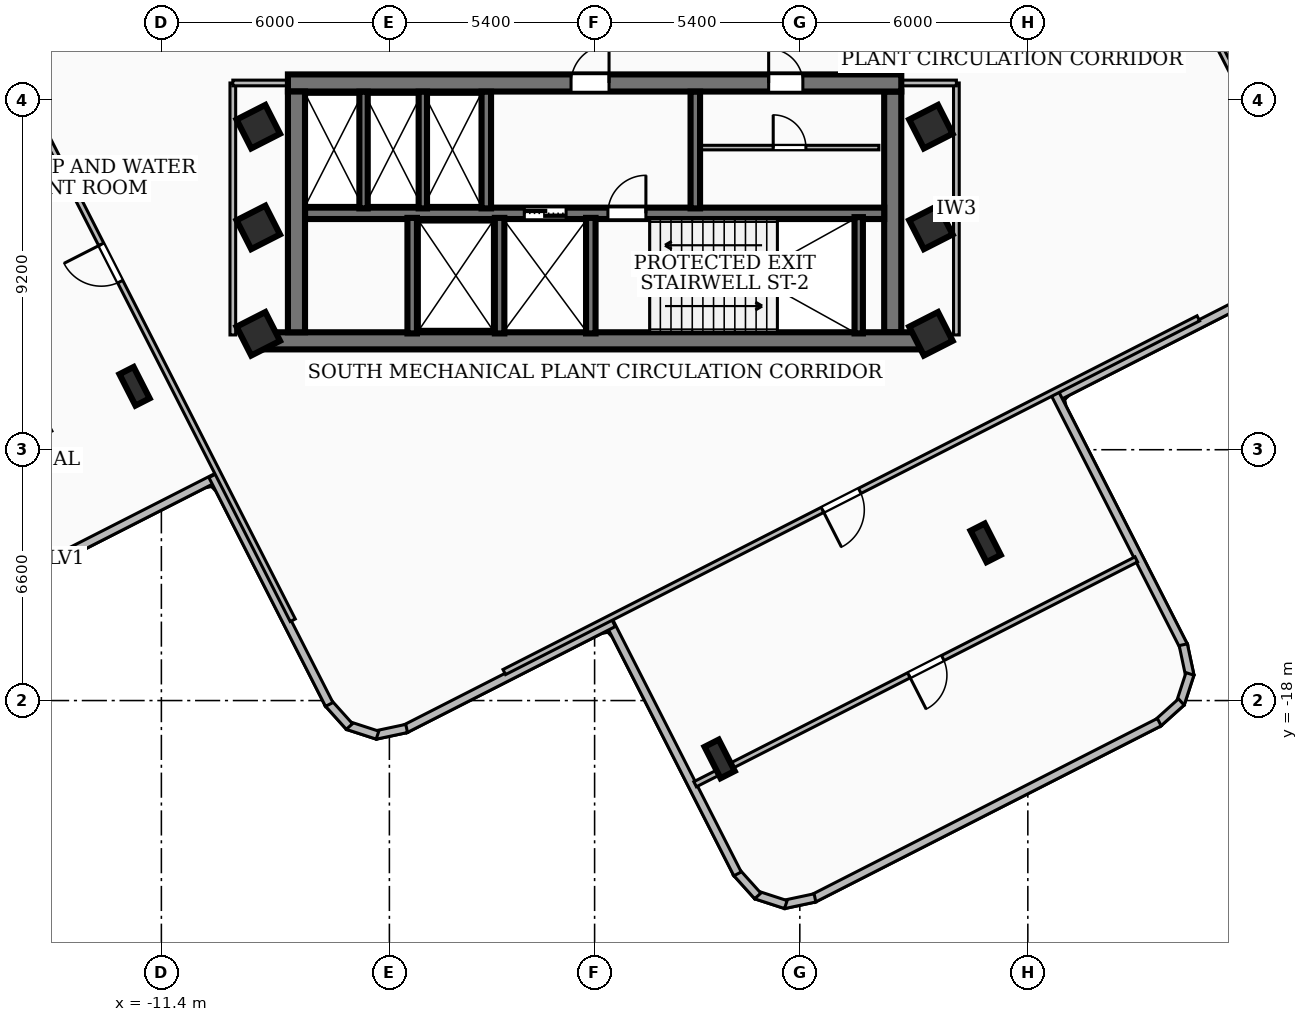
"""IFC4 building model, lengths in metres.
Left out: names, types, materials, properties, quantities, classifications, styles, units other than length and angle.
Written with IfcOpenShell. Run it as: python <this file> out.ifc"""

import sys

from ifc_helpers import new_model, si_unit, direction, frame, frame_2d, origin, origin_2d, place, context, subcontext, project, spatial, rectangle, i_section, extrude, element, fill, save


model = new_model("IFC4")
c1 = context("Model", 3, precision=1e-05, world=origin(), true_north=direction((0.0, 1.0)))
c2 = subcontext(c1, "Body", "Model", "MODEL_VIEW")
j1 = project(units=[si_unit("LENGTHUNIT", "METRE"), si_unit("PLANEANGLEUNIT", "RADIAN")], contexts=[c1])
p1 = place(None, origin())
s1 = spatial("IfcSite", under=j1, at=p1, CompositionType="ELEMENT")
p2 = place(p1, origin())
s2 = spatial("IfcBuilding", under=s1, at=p2, CompositionType="ELEMENT")
p3 = place(p2, frame((0.0, 0.0, 196.2)))
s3 = spatial("IfcBuildingStorey", under=s2, at=p3, CompositionType="ELEMENT", Elevation=196.2)
p4 = place(p3, frame((8.78, -8.535, 0.0), z_axis=(0.0, 0.0, 1.0), x_axis=(-1.0, 0.0, 0.0)))
e1 = element("IfcWall", 1, at=p4, inside=s3, PredefinedType="SHEAR", context=c2, shape_type="SweptSolid", body=[
    extrude(rectangle(XDim=17.56, YDim=0.45, at=frame_2d((8.78, 0.0))), origin(), (0.0, 0.0, 1.0), 4.42),
])
p5 = place(p3, frame((-8.07, -1.75, 0.0), z_axis=(0.0, 0.0, 1.0), x_axis=(1.0, 0.0, 0.0)))
e2 = element("IfcWall", 2, at=p5, inside=s3, PredefinedType="SHEAR", context=c2, shape_type="SweptSolid", body=[
    extrude(rectangle(XDim=16.14, YDim=0.45, at=frame_2d((8.07, 0.0))), origin(), (0.0, 0.0, 1.0), 4.42),
])
p6 = place(p5, frame((7.45, 0.0, 0.0)))
e3 = element("IfcOpeningElement", 3, at=p6, cuts=e2, PredefinedType="OPENING", context=c2, shape_type="SweptSolid", body=[
    extrude(rectangle(XDim=1.0, YDim=2.1, at=frame_2d((0.5, 1.05))), frame((0.0, 0.235, 0.0), z_axis=(0.0, -1.0, 0.0), x_axis=(1.0, 0.0, 0.0)), (0.0, 0.0, 1.0), 0.47),
])
p7 = place(p5, frame((12.65, 0.0, 0.0)))
e4 = element("IfcOpeningElement", 4, at=p7, cuts=e2, PredefinedType="OPENING", context=c2, shape_type="SweptSolid", body=[
    extrude(rectangle(XDim=0.9, YDim=2.06, at=frame_2d((0.45, 1.03))), frame((0.0, 0.235, 0.0), z_axis=(0.0, -1.0, 0.0), x_axis=(1.0, 0.0, 0.0)), (0.0, 0.0, 1.0), 0.47),
])
for number, where, z_axis, x_axis in (
    (5, (-7.845, -8.31, 0.0), (0.0, 0.0, 1.0), (0.0, 1.0, 0.0)),
    (6, (7.845, -1.975, 0.0), (0.0, 0.0, 1.0), (0.0, -1.0, 0.0)),
):
    element("IfcWall", number, at=place(p3, frame(where, z_axis=z_axis, x_axis=x_axis)), inside=s3, PredefinedType="SHEAR", context=c2, shape_type="SweptSolid", body=[
        extrude(rectangle(XDim=6.335, YDim=0.45, at=frame_2d((3.167, 0.0))), origin(), (0.0, 0.0, 1.0), 4.42),
    ])
p8 = place(p3, frame((-7.62, -5.18, 0.0), z_axis=(0.0, 0.0, 1.0), x_axis=(1.0, 0.0, 0.0)))
e7 = element("IfcWall", 7, at=p8, inside=s3, PredefinedType="SOLIDWALL", context=c2, shape_type="SweptSolid", body=[
    extrude(rectangle(XDim=15.24, YDim=0.3, at=frame_2d((7.62, 0.0))), origin(), (0.0, 0.0, 1.0), 4.42),
])
p9 = place(p8, frame((5.77, 0.0, 0.0)))
e8 = element("IfcOpeningElement", 8, at=p9, cuts=e7, PredefinedType="OPENING", context=c2, shape_type="SweptSolid", body=[
    extrude(rectangle(XDim=1.1, YDim=2.15, at=frame_2d((0.55, 1.075))), frame((0.0, 0.16, 0.0), z_axis=(0.0, -1.0, 0.0), x_axis=(1.0, 0.0, 0.0)), (0.0, 0.0, 1.0), 0.32),
])
p10 = place(p8, frame((7.97, 0.0, 0.0)))
e9 = element("IfcOpeningElement", 9, at=p10, cuts=e7, PredefinedType="OPENING", context=c2, shape_type="SweptSolid", body=[
    extrude(rectangle(XDim=1.0, YDim=2.1, at=frame_2d((0.5, 1.05))), frame((0.0, 0.16, 0.0), z_axis=(0.0, -1.0, 0.0), x_axis=(1.0, 0.0, 0.0)), (0.0, 0.0, 1.0), 0.32),
])
p11 = place(p3, frame((6.95, -8.34, 0.0), z_axis=(0.0, 0.0, 1.0), x_axis=(0.0, 1.0, 0.0)))
e10 = element("IfcWall", 10, at=p11, inside=s3, PredefinedType="SOLIDWALL", context=c2, shape_type="SweptSolid", body=[
    extrude(rectangle(XDim=3.06, YDim=0.22, at=frame_2d((1.53, 0.0))), origin(), (0.0, 0.0, 1.0), 4.42),
])
for number, where, z_axis, x_axis in (
    (11, (-0.1, -8.34, 0.0), (0.0, 0.0, 1.0), (0.0, 1.0, 0.0)),
    (12, (-2.5, -8.34, 0.0), (0.0, 0.0, 1.0), (0.0, 1.0, 0.0)),
    (13, (-4.8, -8.34, 0.0), (0.0, 0.0, 1.0), (0.0, 1.0, 0.0)),
):
    element("IfcWall", number, at=place(p3, frame(where, z_axis=z_axis, x_axis=x_axis)), inside=s3, PredefinedType="SOLIDWALL", context=c2, shape_type="SweptSolid", body=[
        extrude(rectangle(XDim=3.04, YDim=0.25, at=frame_2d((1.52, 0.0))), origin(), (0.0, 0.0, 1.0), 4.42),
    ])
for number, where, z_axis, x_axis in (
    (14, (-2.85, -5.05, 0.0), (0.0, 0.0, 1.0), (0.0, 1.0, 0.0)),
    (15, (2.65, -5.05, 0.0), (0.0, 0.0, 1.0), (0.0, 1.0, 0.0)),
):
    element("IfcWall", number, at=place(p3, frame(where, z_axis=z_axis, x_axis=x_axis)), inside=s3, PredefinedType="SOLIDWALL", context=c2, shape_type="SweptSolid", body=[
        extrude(rectangle(XDim=3.07, YDim=0.25, at=frame_2d((1.535, 0.0))), origin(), (0.0, 0.0, 1.0), 4.42),
    ])
for number, where, z_axis, x_axis in (
    (16, (-6.08, -5.05, 0.0), (0.0, 0.0, 1.0), (0.0, 1.0, 0.0)),
    (17, (-4.52, -5.05, 0.0), (0.0, 0.0, 1.0), (0.0, 1.0, 0.0)),
):
    element("IfcWall", number, at=place(p3, frame(where, z_axis=z_axis, x_axis=x_axis)), inside=s3, PredefinedType="SOLIDWALL", context=c2, shape_type="SweptSolid", body=[
        extrude(rectangle(XDim=3.07, YDim=0.22, at=frame_2d((1.535, 0.0))), origin(), (0.0, 0.0, 1.0), 4.42),
    ])
for number, where, z_axis, x_axis in (
    (18, (-8.85, -5.55, 0.0), (0.0, 0.0, 1.0), (0.891, 0.454, 0.0)),
    (19, (-8.85, -2.9, 0.0), (0.0, 0.0, 1.0), (0.891, 0.454, 0.0)),
    (20, (8.85, -5.55, 0.0), (0.0, 0.0, 1.0), (0.891, 0.454, 0.0)),
    (21, (8.85, -2.9, 0.0), (0.0, 0.0, 1.0), (0.891, 0.454, 0.0)),
    (22, (8.85, -8.35, 0.0), (0.0, 0.0, 1.0), (0.891, 0.454, 0.0)),
    (23, (-8.85, -8.35, 0.0), (0.0, 0.0, 1.0), (0.891, 0.454, 0.0)),
):
    element("IfcColumn", number, at=place(p3, frame(where, z_axis=z_axis, x_axis=x_axis)), inside=s3, PredefinedType="COLUMN", context=c2, shape_type="SweptSolid", body=[
        extrude(rectangle(XDim=0.85, YDim=0.85, at=origin_2d()), origin(), (0.0, 0.0, 1.0), 4.68),
    ])
for number, where, z_axis, x_axis in (
    (24, (-12.106, -9.731, 0.0), (0.0, 0.0, 1.0), (0.891, 0.454, 0.0)),
    (25, (3.29, -19.536, 0.0), (0.0, 0.0, 1.0), (0.891, 0.454, 0.0)),
    (26, (10.29, -13.85, 0.0), (0.0, 0.0, 1.0), (0.891, 0.454, 0.0)),
):
    element("IfcColumn", number, at=place(p3, frame(where, z_axis=z_axis, x_axis=x_axis)), inside=s3, PredefinedType="COLUMN", context=c2, shape_type="SweptSolid", body=[
        extrude(i_section(OverallWidth=0.418, OverallDepth=0.927, WebThickness=0.019, FlangeThickness=0.032, at=origin_2d()), origin(), (0.0, 0.0, 1.0), 4.68),
    ])
p12 = place(p3, frame((-9.933, -12.12, 0.0), z_axis=(0.0, 0.0, 1.0), x_axis=(-0.89100493447, -0.453993619724, 0.0)))
e27 = element("IfcWall", 27, at=p12, inside=s3, PredefinedType="SOLIDWALL", context=c2, shape_type="SweptSolid", body=[
    extrude(rectangle(XDim=9.057, YDim=0.22, at=frame_2d((4.528, 0.0))), origin(), (0.0, 0.0, 1.0), 4.42),
])
p13 = place(p3, frame((15.954, 0.495, 0.0), z_axis=(0.0, 0.0, 1.0), x_axis=(0.454003577481, -0.890999860625, 0.0)))
e28 = element("IfcWall", 28, at=p13, inside=s3, PredefinedType="SOLIDWALL", context=c2, shape_type="SweptSolid", body=[
    extrude(rectangle(XDim=6.158, YDim=0.22, at=frame_2d((3.079, 0.0))), origin(), (0.0, 0.0, 1.0), 2.212),
])
p14 = place(p3, frame((18.103, -6.983, 0.0), z_axis=(0.0, 0.0, 1.0), x_axis=(-0.890990691232, -0.454021572326, 0.0)))
e29 = element("IfcWall", 29, at=p14, inside=s3, PredefinedType="SOLIDWALL", context=c2, shape_type="SweptSolid", body=[
    extrude(rectangle(XDim=6.758, YDim=0.22, at=frame_2d((3.379, 0.0))), origin(), (0.0, 0.0, 1.0), 2.212),
])
p15 = place(p3, frame((12.12, -9.933, 0.0), z_axis=(0.0, 0.0, 1.0), x_axis=(0.454075854948, -0.890963028387, 0.0)))
e30 = element("IfcWall", 30, at=p15, inside=s3, PredefinedType="SOLIDWALL", context=c2, shape_type="SweptSolid", body=[
    extrude(rectangle(XDim=7.457, YDim=0.22, at=frame_2d((3.729, 0.0))), origin(), (0.0, 0.0, 1.0), 2.212),
])
p16 = place(p3, frame((15.49, -16.531, 0.0), z_axis=(0.0, 0.0, 1.0), x_axis=(0.207529672301, -0.978228723313, 0.0)))
e31 = element("IfcWall", 31, at=p16, inside=s3, PredefinedType="SOLIDWALL", context=c2, shape_type="SweptSolid", body=[
    extrude(rectangle(XDim=0.834, YDim=0.22, at=frame_2d((0.417, 0.0))), origin(), (0.0, 0.0, 1.0), 4.42),
])
p17 = place(p3, frame((15.666, -17.299, 0.0), z_axis=(0.0, 0.0, 1.0), x_axis=(-0.309962035128, -0.950748934672, 0.0)))
e32 = element("IfcWall", 32, at=p17, inside=s3, PredefinedType="SOLIDWALL", context=c2, shape_type="SweptSolid", body=[
    extrude(rectangle(XDim=0.819, YDim=0.22, at=frame_2d((0.41, 0.0))), origin(), (0.0, 0.0, 1.0), 4.42),
])
p18 = place(p3, frame((15.439, -18.037, 0.0), z_axis=(0.0, 0.0, 1.0), x_axis=(-0.743250545916, -0.66901317326, 0.0)))
e33 = element("IfcWall", 33, at=p18, inside=s3, PredefinedType="SOLIDWALL", context=c2, shape_type="SweptSolid", body=[
    extrude(rectangle(XDim=0.835, YDim=0.22, at=frame_2d((0.417, 0.0))), origin(), (0.0, 0.0, 1.0), 4.42),
])
p19 = place(p3, frame((14.859, -18.568, 0.0), z_axis=(0.0, 0.0, 1.0), x_axis=(-0.890999568682, -0.454004150432, 0.0)))
e34 = element("IfcWall", 34, at=p19, inside=s3, PredefinedType="SOLIDWALL", context=c2, shape_type="SweptSolid", body=[
    extrude(rectangle(XDim=10.22, YDim=0.22, at=frame_2d((5.11, 0.0))), origin(), (0.0, 0.0, 1.0), 4.42),
])
p20 = place(p3, frame((5.799, -23.192, 0.0), z_axis=(0.0, 0.0, 1.0), x_axis=(-0.978190855041, -0.207708091112, 0.0)))
e35 = element("IfcWall", 35, at=p20, inside=s3, PredefinedType="SOLIDWALL", context=c2, shape_type="SweptSolid", body=[
    extrude(rectangle(XDim=0.833, YDim=0.22, at=frame_2d((0.417, 0.0))), origin(), (0.0, 0.0, 1.0), 4.42),
])
p21 = place(p3, frame((5.032, -23.368, 0.0), z_axis=(0.0, 0.0, 1.0), x_axis=(-0.950891804303, 0.309523466815, 0.0)))
e36 = element("IfcWall", 36, at=p21, inside=s3, PredefinedType="SOLIDWALL", context=c2, shape_type="SweptSolid", body=[
    extrude(rectangle(XDim=0.82, YDim=0.22, at=frame_2d((0.41, 0.0))), origin(), (0.0, 0.0, 1.0), 4.42),
])
p22 = place(p3, frame((4.293, -23.141, 0.0), z_axis=(0.0, 0.0, 1.0), x_axis=(-0.669029293194, 0.743236035758, 0.0)))
e37 = element("IfcWall", 37, at=p22, inside=s3, PredefinedType="SOLIDWALL", context=c2, shape_type="SweptSolid", body=[
    extrude(rectangle(XDim=0.836, YDim=0.22, at=frame_2d((0.418, 0.0))), origin(), (0.0, 0.0, 1.0), 4.42),
])
p23 = place(p3, frame((3.762, -22.561, 0.0), z_axis=(0.0, 0.0, 1.0), x_axis=(-0.453905674287, 0.89104973983, 0.0)))
e38 = element("IfcWall", 38, at=p23, inside=s3, PredefinedType="SOLIDWALL", context=c2, shape_type="SweptSolid", body=[
    extrude(rectangle(XDim=7.458, YDim=0.22, at=frame_2d((3.729, 0.0))), origin(), (0.0, 0.0, 1.0), 2.212),
])
p24 = place(p3, frame((0.495, -15.954, 0.0), z_axis=(0.0, 0.0, 1.0), x_axis=(-0.890999860625, -0.454003577481, 0.0)))
e39 = element("IfcWall", 39, at=p24, inside=s3, PredefinedType="SOLIDWALL", context=c2, shape_type="SweptSolid", body=[
    extrude(rectangle(XDim=6.158, YDim=0.22, at=frame_2d((3.079, 0.0))), origin(), (0.0, 0.0, 1.0), 2.212),
])
p25 = place(p3, frame((-4.946, -18.734, 0.0), z_axis=(0.0, 0.0, 1.0), x_axis=(-0.978178210569, -0.207767630705, 0.0)))
e40 = element("IfcWall", 40, at=p25, inside=s3, PredefinedType="SOLIDWALL", context=c2, shape_type="SweptSolid", body=[
    extrude(rectangle(XDim=0.833, YDim=0.22, at=frame_2d((0.417, 0.0))), origin(), (0.0, 0.0, 1.0), 4.42),
])
p26 = place(p3, frame((-5.713, -18.91, 0.0), z_axis=(0.0, 0.0, 1.0), x_axis=(-0.950891804303, 0.309523466815, 0.0)))
e41 = element("IfcWall", 41, at=p26, inside=s3, PredefinedType="SOLIDWALL", context=c2, shape_type="SweptSolid", body=[
    extrude(rectangle(XDim=0.82, YDim=0.22, at=frame_2d((0.41, 0.0))), origin(), (0.0, 0.0, 1.0), 4.42),
])
p27 = place(p3, frame((-6.452, -18.683, 0.0), z_axis=(0.0, 0.0, 1.0), x_axis=(-0.669029293194, 0.743236035758, 0.0)))
e42 = element("IfcWall", 42, at=p27, inside=s3, PredefinedType="SOLIDWALL", context=c2, shape_type="SweptSolid", body=[
    extrude(rectangle(XDim=0.836, YDim=0.22, at=frame_2d((0.418, 0.0))), origin(), (0.0, 0.0, 1.0), 4.42),
])
p28 = place(p3, frame((-6.983, -18.103, 0.0), z_axis=(0.0, 0.0, 1.0), x_axis=(-0.454021572326, 0.890990691232, 0.0)))
e43 = element("IfcWall", 43, at=p28, inside=s3, PredefinedType="SOLIDWALL", context=c2, shape_type="SweptSolid", body=[
    extrude(rectangle(XDim=6.758, YDim=0.22, at=frame_2d((3.379, 0.0))), origin(), (0.0, 0.0, 1.0), 4.42),
])
p29 = place(p3, frame((2.8, -3.45, 0.0), z_axis=(0.0, 0.0, 1.0), x_axis=(1.0, 0.0, 0.0)))
e44 = element("IfcWall", 44, at=p29, inside=s3, PredefinedType="PARTITIONING", context=c2, shape_type="SweptSolid", body=[
    extrude(rectangle(XDim=4.68, YDim=0.12, at=frame_2d((2.34, 0.0))), origin(), (0.0, 0.0, 1.0), 4.42),
])
p30 = place(p29, frame((1.9, 0.0, 0.0)))
e45 = element("IfcOpeningElement", 45, at=p30, cuts=e44, PredefinedType="OPENING", context=c2, shape_type="SweptSolid", body=[
    extrude(rectangle(XDim=0.86, YDim=2.04, at=frame_2d((0.43, 1.02))), frame((0.0, 0.07, 0.0), z_axis=(0.0, -1.0, 0.0), x_axis=(1.0, 0.0, 0.0)), (0.0, 0.0, 1.0), 0.14),
])
p31 = place(p3, frame((-9.52, -8.38, 0.0), z_axis=(0.0, 0.0, 1.0), x_axis=(0.0, 1.0, 0.0)))
e46 = element("IfcWall", 46, at=p31, inside=s3, PredefinedType="PARTITIONING", context=c2, shape_type="SweptSolid", body=[
    extrude(rectangle(XDim=6.63, YDim=0.15, at=frame_2d((3.315, 0.0))), origin(), (0.0, 0.0, 1.0), 2.212),
])
p32 = place(p3, frame((-7.85, -1.75, 0.0), z_axis=(0.0, 0.0, 1.0), x_axis=(-1.0, 0.0, 0.0)))
e47 = element("IfcWall", 47, at=p32, inside=s3, PredefinedType="PARTITIONING", context=c2, shape_type="SweptSolid", body=[
    extrude(rectangle(XDim=1.67, YDim=0.15, at=frame_2d((0.835, 0.0))), origin(), (0.0, 0.0, 1.0), 3.65),
])
p33 = place(p3, frame((9.52, -8.38, 0.0), z_axis=(0.0, 0.0, 1.0), x_axis=(0.0, 1.0, 0.0)))
e48 = element("IfcWall", 48, at=p33, inside=s3, PredefinedType="PARTITIONING", context=c2, shape_type="SweptSolid", body=[
    extrude(rectangle(XDim=6.63, YDim=0.15, at=frame_2d((3.315, 0.0))), origin(), (0.0, 0.0, 1.0), 4.42),
])
p34 = place(p3, frame((7.85, -1.75, 0.0), z_axis=(0.0, 0.0, 1.0), x_axis=(1.0, 0.0, 0.0)))
e49 = element("IfcWall", 49, at=p34, inside=s3, PredefinedType="PARTITIONING", context=c2, shape_type="SweptSolid", body=[
    extrude(rectangle(XDim=1.67, YDim=0.15, at=frame_2d((0.835, 0.0))), origin(), (0.0, 0.0, 1.0), 3.65),
])
p35 = place(p3, frame((7.943, 15.887, 0.0), z_axis=(0.0, 0.0, 1.0), x_axis=(0.454027476073, -0.890987682839, 0.0)))
e50 = element("IfcWall", 50, at=p35, inside=s3, PredefinedType="PARTITIONING", context=c2, shape_type="SweptSolid", body=[
    extrude(rectangle(XDim=20.499, YDim=0.15, at=frame_2d((10.249, 0.0))), origin(), (0.0, 0.0, 1.0), 2.212),
])
p36 = place(p35, frame((10.0, 0.0, 0.0)))
e51 = element("IfcOpeningElement", 51, at=p36, cuts=e50, PredefinedType="OPENING", context=c2, shape_type="SweptSolid", body=[
    extrude(rectangle(XDim=1.1, YDim=2.15, at=frame_2d((0.55, 1.075))), frame((0.0, 0.085, 0.0), z_axis=(0.0, -1.0, 0.0), x_axis=(1.0, 0.0, 0.0)), (0.0, 0.0, 1.0), 0.17),
])
p37 = place(p3, frame((15.887, -7.943, 0.0), z_axis=(0.0, 0.0, 1.0), x_axis=(-0.890987682839, -0.454027476073, 0.0)))
e52 = element("IfcWall", 52, at=p37, inside=s3, PredefinedType="PARTITIONING", context=c2, shape_type="SweptSolid", body=[
    extrude(rectangle(XDim=20.499, YDim=0.15, at=frame_2d((10.249, 0.0))), origin(), (0.0, 0.0, 1.0), 2.212),
])
p38 = place(p37, frame((10.0, 0.0, 0.0)))
e53 = element("IfcOpeningElement", 53, at=p38, cuts=e52, PredefinedType="OPENING", context=c2, shape_type="SweptSolid", body=[
    extrude(rectangle(XDim=1.1, YDim=2.15, at=frame_2d((0.55, 1.075))), frame((0.0, 0.085, 0.0), z_axis=(0.0, -1.0, 0.0), x_axis=(1.0, 0.0, 0.0)), (0.0, 0.0, 1.0), 0.17),
])
p39 = place(p3, frame((14.254, -14.286, 0.0), z_axis=(0.0, 0.0, 1.0), x_axis=(-0.890975712232, -0.454050966536, 0.0)))
e54 = element("IfcWall", 54, at=p39, inside=s3, PredefinedType="PARTITIONING", context=c2, shape_type="SweptSolid", body=[
    extrude(rectangle(XDim=13.029, YDim=0.15, at=frame_2d((6.515, 0.0))), origin(), (0.0, 0.0, 1.0), 2.212),
])
p40 = place(p39, frame((5.715, 0.0, 0.0)))
e55 = element("IfcOpeningElement", 55, at=p40, cuts=e54, PredefinedType="OPENING", context=c2, shape_type="SweptSolid", body=[
    extrude(rectangle(XDim=1.0, YDim=2.1, at=frame_2d((0.5, 1.05))), frame((0.0, 0.085, 0.0), z_axis=(0.0, -1.0, 0.0), x_axis=(1.0, 0.0, 0.0)), (0.0, 0.0, 1.0), 0.17),
])
p41 = place(p3, frame((-7.943, -15.887, 0.0), z_axis=(0.0, 0.0, 1.0), x_axis=(-0.454027476073, 0.890987682839, 0.0)))
e56 = element("IfcWall", 56, at=p41, inside=s3, PredefinedType="PARTITIONING", context=c2, shape_type="SweptSolid", body=[
    extrude(rectangle(XDim=20.499, YDim=0.15, at=frame_2d((10.249, 0.0))), origin(), (0.0, 0.0, 1.0), 2.212),
])
p42 = place(p41, frame((10.0, 0.0, 0.0)))
e57 = element("IfcOpeningElement", 57, at=p42, cuts=e56, PredefinedType="OPENING", context=c2, shape_type="SweptSolid", body=[
    extrude(rectangle(XDim=1.1, YDim=2.15, at=frame_2d((0.55, 1.075))), frame((0.0, 0.085, 0.0), z_axis=(0.0, -1.0, 0.0), x_axis=(1.0, 0.0, 0.0)), (0.0, 0.0, 1.0), 0.17),
])
p43 = place(p3, frame((-14.286, -14.254, 0.0), z_axis=(0.0, 0.0, 1.0), x_axis=(-0.454050966536, 0.890975712232, 0.0)))
e58 = element("IfcWall", 58, at=p43, inside=s3, PredefinedType="PARTITIONING", context=c2, shape_type="SweptSolid", body=[
    extrude(rectangle(XDim=13.029, YDim=0.15, at=frame_2d((6.515, 0.0))), origin(), (0.0, 0.0, 1.0), 2.212),
])
p44 = place(p43, frame((5.715, 0.0, 0.0)))
e59 = element("IfcOpeningElement", 59, at=p44, cuts=e58, PredefinedType="OPENING", context=c2, shape_type="SweptSolid", body=[
    extrude(rectangle(XDim=1.0, YDim=2.1, at=frame_2d((0.5, 1.05))), frame((0.0, 0.085, 0.0), z_axis=(0.0, -1.0, 0.0), x_axis=(1.0, 0.0, 0.0)), (0.0, 0.0, 1.0), 0.17),
])
p45 = place(p6, origin())
e60 = element("IfcDoor", 60, at=p45, inside=s3, OperationType="SINGLE_SWING_RIGHT", PredefinedType="DOOR", context=c2, shape_type="SweptSolid", body=[
    extrude(rectangle(XDim=1.0, YDim=2.1, at=frame_2d((0.5, 1.05))), frame((0.0, 0.025, 0.0), z_axis=(0.0, -1.0, 0.0), x_axis=(1.0, 0.0, 0.0)), (0.0, 0.0, 1.0), 0.05),
])
fill(e3, e60)
p46 = place(p9, origin())
e61 = element("IfcDoor", 61, at=p46, inside=s3, OperationType="DOUBLE_DOOR_SLIDING", PredefinedType="DOOR", context=c2, shape_type="SweptSolid", body=[
    extrude(rectangle(XDim=1.1, YDim=2.15, at=frame_2d((0.55, 1.075))), frame((0.0, 0.025, 0.0), z_axis=(0.0, -1.0, 0.0), x_axis=(1.0, 0.0, 0.0)), (0.0, 0.0, 1.0), 0.05),
])
fill(e8, e61)
p47 = place(p10, origin())
e62 = element("IfcDoor", 62, at=p47, inside=s3, OperationType="SINGLE_SWING_RIGHT", PredefinedType="DOOR", context=c2, shape_type="SweptSolid", body=[
    extrude(rectangle(XDim=1.0, YDim=2.1, at=frame_2d((0.5, 1.05))), frame((0.0, 0.025, 0.0), z_axis=(0.0, -1.0, 0.0), x_axis=(1.0, 0.0, 0.0)), (0.0, 0.0, 1.0), 0.05),
])
fill(e9, e62)
p48 = place(p7, origin())
e63 = element("IfcDoor", 63, at=p48, inside=s3, OperationType="SINGLE_SWING_LEFT", PredefinedType="DOOR", context=c2, shape_type="SweptSolid", body=[
    extrude(rectangle(XDim=0.9, YDim=2.06, at=frame_2d((0.45, 1.03))), frame((0.0, 0.025, 0.0), z_axis=(0.0, -1.0, 0.0), x_axis=(1.0, 0.0, 0.0)), (0.0, 0.0, 1.0), 0.05),
])
fill(e4, e63)
p49 = place(p30, origin())
e64 = element("IfcDoor", 64, at=p49, inside=s3, OperationType="SINGLE_SWING_LEFT", PredefinedType="DOOR", context=c2, shape_type="SweptSolid", body=[
    extrude(rectangle(XDim=0.86, YDim=2.04, at=frame_2d((0.43, 1.02))), frame((0.0, 0.025, 0.0), z_axis=(0.0, -1.0, 0.0), x_axis=(1.0, 0.0, 0.0)), (0.0, 0.0, 1.0), 0.05),
])
fill(e45, e64)
p50 = place(p38, origin())
e65 = element("IfcDoor", 65, at=p50, inside=s3, OperationType="SINGLE_SWING_RIGHT", PredefinedType="DOOR", context=c2, shape_type="SweptSolid", body=[
    extrude(rectangle(XDim=1.1, YDim=2.15, at=frame_2d((0.55, 1.075))), frame((0.0, 0.025, 0.0), z_axis=(0.0, -1.0, 0.0), x_axis=(1.0, 0.0, 0.0)), (0.0, 0.0, 1.0), 0.05),
])
fill(e53, e65)
p51 = place(p40, origin())
e66 = element("IfcDoor", 66, at=p51, inside=s3, OperationType="SINGLE_SWING_RIGHT", PredefinedType="DOOR", context=c2, shape_type="SweptSolid", body=[
    extrude(rectangle(XDim=1.0, YDim=2.1, at=frame_2d((0.5, 1.05))), frame((0.0, 0.025, 0.0), z_axis=(0.0, -1.0, 0.0), x_axis=(1.0, 0.0, 0.0)), (0.0, 0.0, 1.0), 0.05),
])
fill(e55, e66)
p52 = place(p42, origin())
e67 = element("IfcDoor", 67, at=p52, inside=s3, OperationType="SINGLE_SWING_RIGHT", PredefinedType="DOOR", context=c2, shape_type="SweptSolid", body=[
    extrude(rectangle(XDim=1.1, YDim=2.15, at=frame_2d((0.55, 1.075))), frame((0.0, 0.025, 0.0), z_axis=(0.0, -1.0, 0.0), x_axis=(1.0, 0.0, 0.0)), (0.0, 0.0, 1.0), 0.05),
])
fill(e57, e67)
save(model, sys.argv[1])
